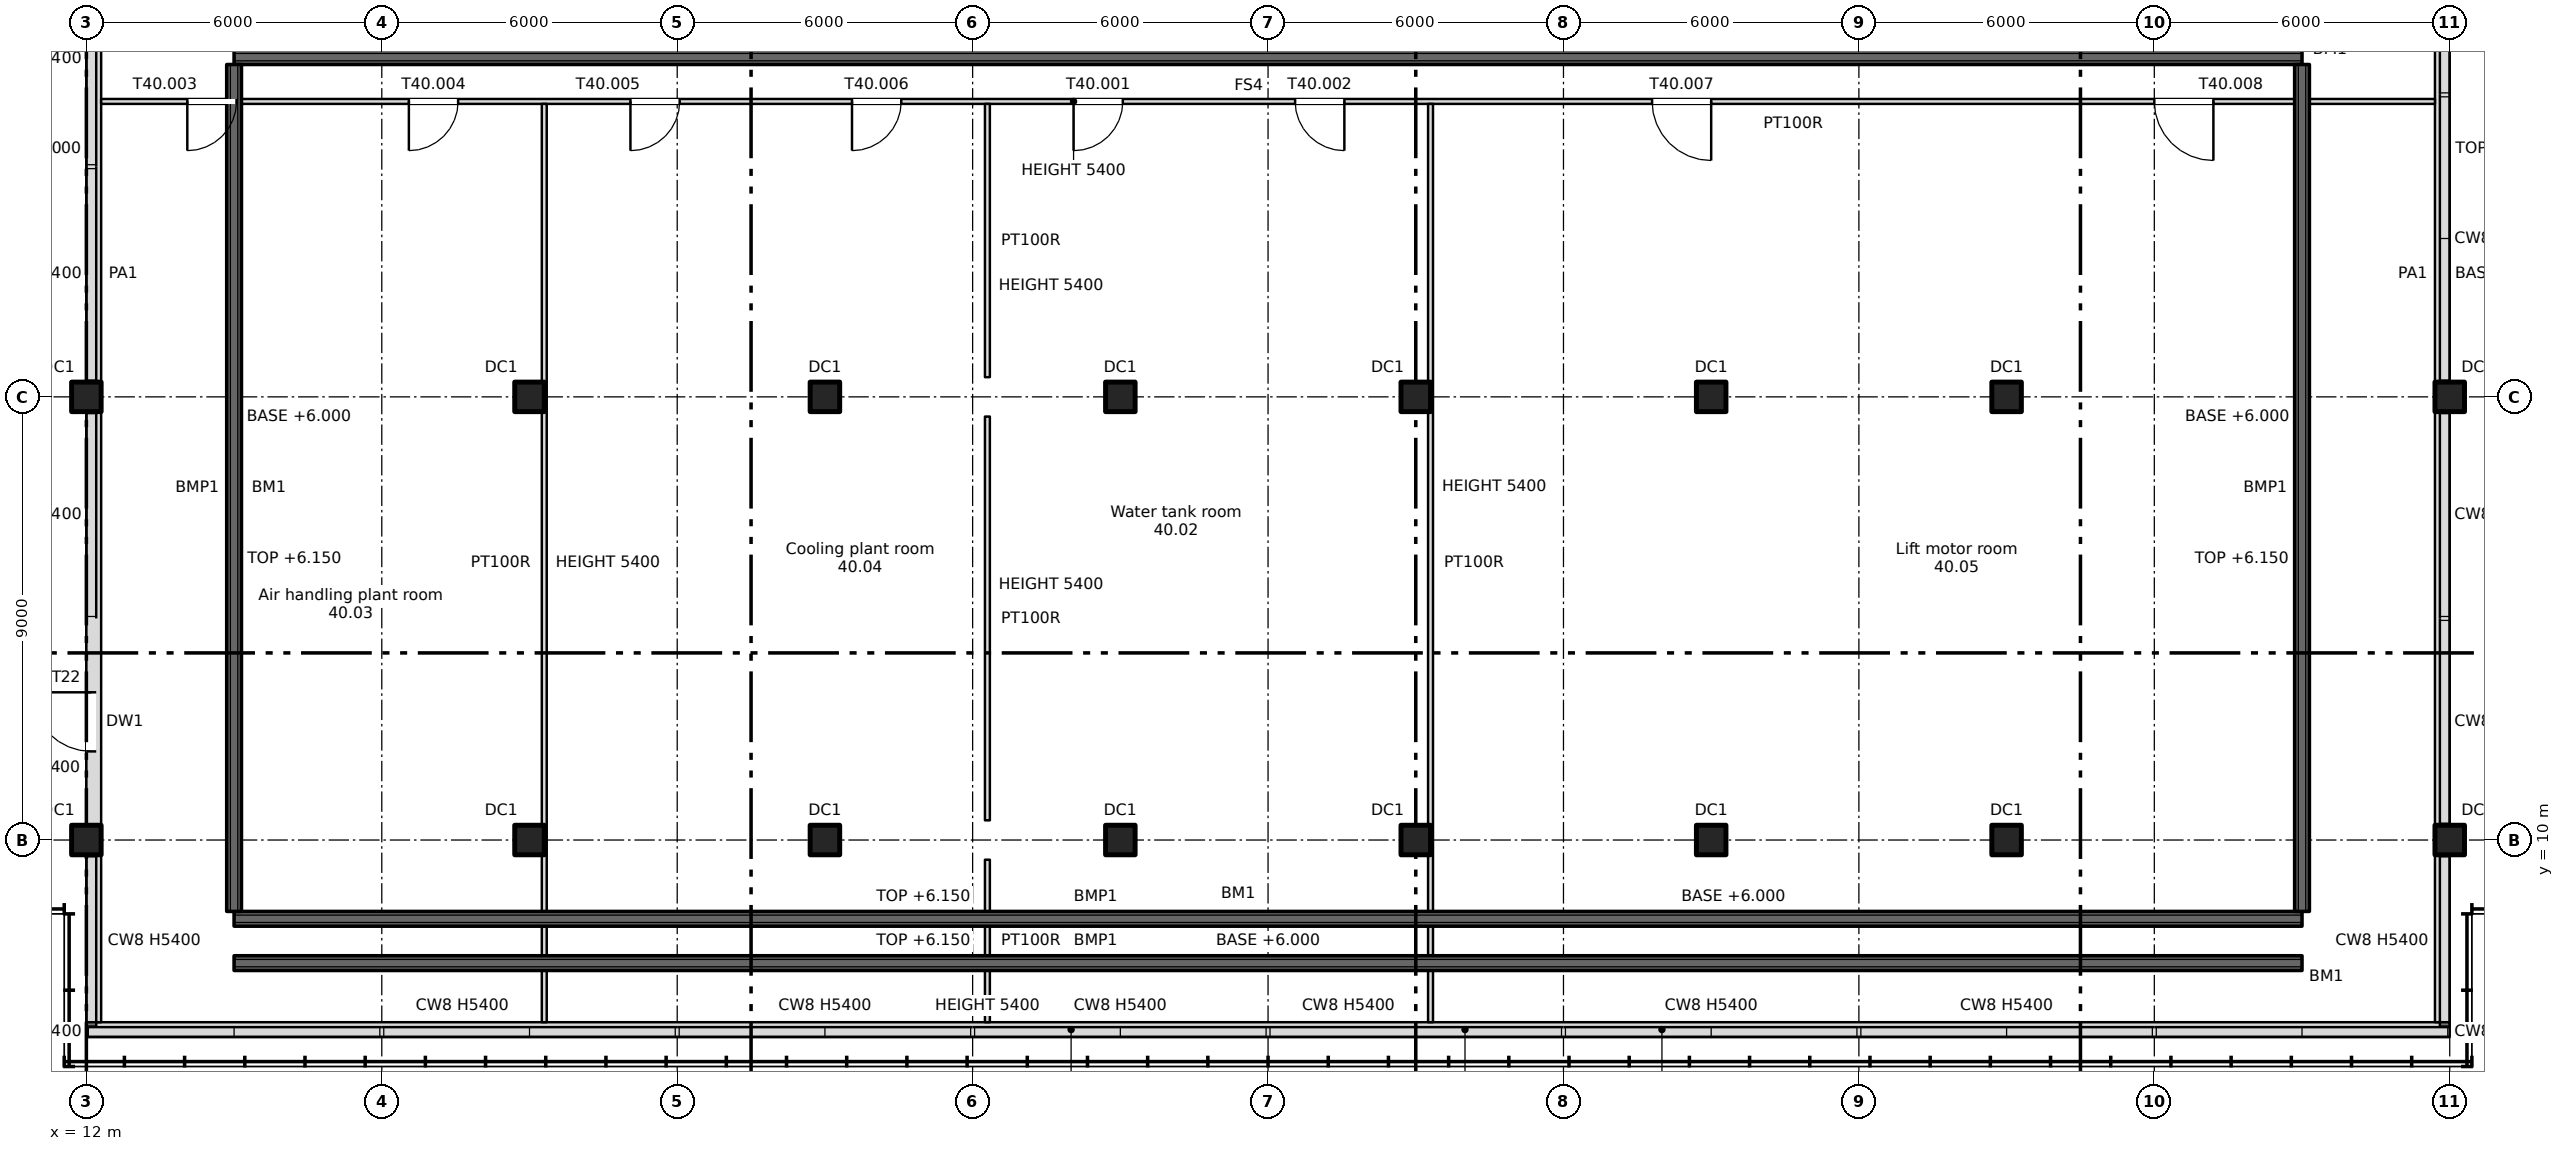
"""IFC4 building model, lengths in metres.
Left out: names, types, materials, properties, quantities, classifications, styles, units other than length and angle.
Written with IfcOpenShell. Run it as: python <this file> out.ifc"""

import sys

from ifc_helpers import new_model, si_unit, direction, frame, frame_2d, origin, origin_2d, place, context, subcontext, project, spatial, rectangle, extrude, element, fill, save


model = new_model("IFC4")
c1 = context("Model", 3, precision=1e-05, world=origin(), true_north=direction((0.0, 1.0)))
c2 = subcontext(c1, "Body", "Model", "MODEL_VIEW")
j1 = project(units=[si_unit("LENGTHUNIT", "METRE"), si_unit("PLANEANGLEUNIT", "RADIAN")], contexts=[c1])
p1 = place(None, origin())
s1 = spatial("IfcSite", under=j1, at=p1, CompositionType="ELEMENT")
p2 = place(p1, origin())
s2 = spatial("IfcBuilding", under=s1, at=p2, CompositionType="ELEMENT")
p3 = place(p2, frame((0.0, 0.0, 271.95)))
s3 = spatial("IfcBuildingStorey", under=s2, at=p3, CompositionType="ELEMENT", Elevation=271.95)
for number, where, z_axis, x_axis in (
    (1, (21.0, 10.0, 0.0), (0.0, 0.0, 1.0), (1.0, 0.0, 0.0)),
    (2, (27.0, 10.0, 0.0), (0.0, 0.0, 1.0), (1.0, 0.0, 0.0)),
    (3, (33.0, 10.0, 0.0), (0.0, 0.0, 1.0), (1.0, 0.0, 0.0)),
    (4, (39.0, 10.0, 0.0), (0.0, 0.0, 1.0), (1.0, 0.0, 0.0)),
    (5, (45.0, 10.0, 0.0), (0.0, 0.0, 1.0), (1.0, 0.0, 0.0)),
    (6, (51.0, 10.0, 0.0), (0.0, 0.0, 1.0), (1.0, 0.0, 0.0)),
    (7, (21.0, 19.0, 0.0), (0.0, 0.0, 1.0), (1.0, 0.0, 0.0)),
    (8, (27.0, 19.0, 0.0), (0.0, 0.0, 1.0), (1.0, 0.0, 0.0)),
    (9, (33.0, 19.0, 0.0), (0.0, 0.0, 1.0), (1.0, 0.0, 0.0)),
    (10, (39.0, 19.0, 0.0), (0.0, 0.0, 1.0), (1.0, 0.0, 0.0)),
    (11, (45.0, 19.0, 0.0), (0.0, 0.0, 1.0), (1.0, 0.0, 0.0)),
    (12, (51.0, 19.0, 0.0), (0.0, 0.0, 1.0), (1.0, 0.0, 0.0)),
    (13, (12.0, 10.0, 0.0), (0.0, 0.0, 1.0), (1.0, 0.0, 0.0)),
    (14, (12.0, 19.0, 0.0), (0.0, 0.0, 1.0), (1.0, 0.0, 0.0)),
    (15, (60.0, 10.0, 0.0), (0.0, 0.0, 1.0), (1.0, 0.0, 0.0)),
    (16, (60.0, 19.0, 0.0), (0.0, 0.0, 1.0), (1.0, 0.0, 0.0)),
):
    element("IfcColumn", number, at=place(p3, frame(where, z_axis=z_axis, x_axis=x_axis)), inside=s3, PredefinedType="COLUMN", context=c2, shape_type="SweptSolid", body=[
        extrude(rectangle(XDim=0.6, YDim=0.6, at=origin_2d()), origin(), (0.0, 0.0, 1.0), 5.5),
    ])
p4 = place(p3, frame((12.1, 10.3, 0.0), z_axis=(0.0, 0.0, 1.0), x_axis=(0.0, 1.0, 0.0)))
e17 = element("IfcWall", 17, at=p4, inside=s3, PredefinedType="SOLIDWALL", context=c2, shape_type="SweptSolid", body=[
    extrude(rectangle(XDim=4.2, YDim=0.2, at=frame_2d((2.1, 0.0))), origin(), (0.0, 0.0, 1.0), 5.4),
])
p5 = place(p4, frame((1.5, 0.0, 0.0)))
e18 = element("IfcOpeningElement", 18, at=p5, cuts=e17, PredefinedType="OPENING", context=c2, shape_type="SweptSolid", body=[
    extrude(rectangle(XDim=1.2, YDim=2.4, at=frame_2d((0.6, 1.2))), frame((0.0, 0.11, 0.0), z_axis=(0.0, -1.0, 0.0), x_axis=(1.0, 0.0, 0.0)), (0.0, 0.0, 1.0), 0.22),
])
p6 = place(p3, frame((12.0, 6.15, 6.0), z_axis=(0.0, 0.0, 1.0), x_axis=(1.0, 0.0, 0.0)))
e19 = element("IfcWall", 19, at=p6, inside=s3, PredefinedType="PARAPET", context=c2, shape_type="SweptSolid", body=[
    extrude(rectangle(XDim=48.0, YDim=0.3, at=frame_2d((24.0, 0.0))), origin(), (0.0, 0.0, 1.0), 1.1),
])
for number, where, z_axis, x_axis in (
    (20, (12.15, 6.3, 6.0), (0.0, 0.0, 1.0), (0.0, 1.0, 0.0)),
    (21, (59.85, 6.3, 6.0), (0.0, 0.0, 1.0), (0.0, 1.0, 0.0)),
):
    element("IfcWall", number, at=place(p3, frame(where, z_axis=z_axis, x_axis=x_axis)), inside=s3, PredefinedType="PARAPET", context=c2, shape_type="SweptSolid", body=[
        extrude(rectangle(XDim=30.4, YDim=0.3, at=frame_2d((15.2, 0.0))), origin(), (0.0, 0.0, 1.0), 1.1),
    ])
for number, where, z_axis, x_axis in (
    (22, (15.0, 7.5, 6.0), (0.0, 0.0, 1.0), (1.0, 0.0, 0.0)),
    (23, (15.0, 8.4, 6.0), (0.0, 0.0, 1.0), (1.0, 0.0, 0.0)),
    (24, (15.0, 25.9, 6.0), (0.0, 0.0, 1.0), (1.0, 0.0, 0.0)),
):
    element("IfcWall", number, at=place(p3, frame(where, z_axis=z_axis, x_axis=x_axis)), inside=s3, PredefinedType="SOLIDWALL", context=c2, shape_type="SweptSolid", body=[
        extrude(rectangle(XDim=42.0, YDim=0.3, at=frame_2d((21.0, 0.0))), origin(), (0.0, 0.0, 1.0), 0.15),
    ])
for number, where, z_axis, x_axis in (
    (25, (15.0, 8.55, 6.0), (0.0, 0.0, 1.0), (0.0, 1.0, 0.0)),
    (26, (57.0, 8.55, 6.0), (0.0, 0.0, 1.0), (0.0, 1.0, 0.0)),
):
    element("IfcWall", number, at=place(p3, frame(where, z_axis=z_axis, x_axis=x_axis)), inside=s3, PredefinedType="SOLIDWALL", context=c2, shape_type="SweptSolid", body=[
        extrude(rectangle(XDim=17.2, YDim=0.3, at=frame_2d((8.6, 0.0))), origin(), (0.0, 0.0, 1.0), 0.15),
    ])
p7 = place(p3, frame((12.3, 25.0, 0.0), z_axis=(0.0, 0.0, 1.0), x_axis=(1.0, 0.0, 0.0)))
e27 = element("IfcWall", 27, at=p7, inside=s3, PredefinedType="PARTITIONING", context=c2, shape_type="SweptSolid", body=[
    extrude(rectangle(XDim=47.4, YDim=0.1, at=frame_2d((23.7, 0.0))), origin(), (0.0, 0.0, 1.0), 5.4),
])
p8 = place(p7, frame((19.75, 0.0, 0.0)))
e28 = element("IfcOpeningElement", 28, at=p8, cuts=e27, PredefinedType="OPENING", context=c2, shape_type="SweptSolid", body=[
    extrude(rectangle(XDim=1.0, YDim=2.1, at=frame_2d((0.5, 1.05))), frame((0.0, 0.06, 0.0), z_axis=(0.0, -1.0, 0.0), x_axis=(1.0, 0.0, 0.0)), (0.0, 0.0, 1.0), 0.12),
])
p9 = place(p7, frame((24.25, 0.0, 0.0)))
e29 = element("IfcOpeningElement", 29, at=p9, cuts=e27, PredefinedType="OPENING", context=c2, shape_type="SweptSolid", body=[
    extrude(rectangle(XDim=1.0, YDim=2.1, at=frame_2d((0.5, 1.05))), frame((0.0, 0.06, 0.0), z_axis=(0.0, -1.0, 0.0), x_axis=(1.0, 0.0, 0.0)), (0.0, 0.0, 1.0), 0.12),
])
p10 = place(p7, frame((1.75, 0.0, 0.0)))
e30 = element("IfcOpeningElement", 30, at=p10, cuts=e27, PredefinedType="OPENING", context=c2, shape_type="SweptSolid", body=[
    extrude(rectangle(XDim=1.0, YDim=2.1, at=frame_2d((0.5, 1.05))), frame((0.0, 0.06, 0.0), z_axis=(0.0, -1.0, 0.0), x_axis=(1.0, 0.0, 0.0)), (0.0, 0.0, 1.0), 0.12),
])
p11 = place(p7, frame((6.25, 0.0, 0.0)))
e31 = element("IfcOpeningElement", 31, at=p11, cuts=e27, PredefinedType="OPENING", context=c2, shape_type="SweptSolid", body=[
    extrude(rectangle(XDim=1.0, YDim=2.1, at=frame_2d((0.5, 1.05))), frame((0.0, 0.06, 0.0), z_axis=(0.0, -1.0, 0.0), x_axis=(1.0, 0.0, 0.0)), (0.0, 0.0, 1.0), 0.12),
])
p12 = place(p7, frame((10.75, 0.0, 0.0)))
e32 = element("IfcOpeningElement", 32, at=p12, cuts=e27, PredefinedType="OPENING", context=c2, shape_type="SweptSolid", body=[
    extrude(rectangle(XDim=1.0, YDim=2.1, at=frame_2d((0.5, 1.05))), frame((0.0, 0.06, 0.0), z_axis=(0.0, -1.0, 0.0), x_axis=(1.0, 0.0, 0.0)), (0.0, 0.0, 1.0), 0.12),
])
p13 = place(p7, frame((15.25, 0.0, 0.0)))
e33 = element("IfcOpeningElement", 33, at=p13, cuts=e27, PredefinedType="OPENING", context=c2, shape_type="SweptSolid", body=[
    extrude(rectangle(XDim=1.0, YDim=2.1, at=frame_2d((0.5, 1.05))), frame((0.0, 0.06, 0.0), z_axis=(0.0, -1.0, 0.0), x_axis=(1.0, 0.0, 0.0)), (0.0, 0.0, 1.0), 0.12),
])
p14 = place(p7, frame((31.5, 0.0, 0.0)))
e34 = element("IfcOpeningElement", 34, at=p14, cuts=e27, PredefinedType="OPENING", context=c2, shape_type="SweptSolid", body=[
    extrude(rectangle(XDim=1.2, YDim=2.1, at=frame_2d((0.6, 1.05))), frame((0.0, 0.06, 0.0), z_axis=(0.0, -1.0, 0.0), x_axis=(1.0, 0.0, 0.0)), (0.0, 0.0, 1.0), 0.12),
])
p15 = place(p7, frame((41.7, 0.0, 0.0)))
e35 = element("IfcOpeningElement", 35, at=p15, cuts=e27, PredefinedType="OPENING", context=c2, shape_type="SweptSolid", body=[
    extrude(rectangle(XDim=1.2, YDim=2.1, at=frame_2d((0.6, 1.05))), frame((0.0, 0.06, 0.0), z_axis=(0.0, -1.0, 0.0), x_axis=(1.0, 0.0, 0.0)), (0.0, 0.0, 1.0), 0.12),
])
p16 = place(p3, frame((21.3, 6.3, 0.0), z_axis=(0.0, 0.0, 1.0), x_axis=(0.0, 1.0, 0.0)))
e36 = element("IfcWall", 36, at=p16, inside=s3, PredefinedType="PARTITIONING", context=c2, shape_type="SweptSolid", body=[
    extrude(rectangle(XDim=18.65, YDim=0.1, at=frame_2d((9.325, 0.0))), origin(), (0.0, 0.0, 1.0), 5.4),
])
p17 = place(p3, frame((30.3, 6.3, 0.0), z_axis=(0.0, 0.0, 1.0), x_axis=(0.0, 1.0, 0.0)))
e37 = element("IfcWall", 37, at=p17, inside=s3, PredefinedType="PARTITIONING", context=c2, shape_type="SweptSolid", body=[
    extrude(rectangle(XDim=3.3, YDim=0.1, at=frame_2d((1.65, 0.0))), origin(), (0.0, 0.0, 1.0), 5.4),
])
p18 = place(p3, frame((30.3, 10.4, 0.0), z_axis=(0.0, 0.0, 1.0), x_axis=(0.0, 1.0, 0.0)))
e38 = element("IfcWall", 38, at=p18, inside=s3, PredefinedType="PARTITIONING", context=c2, shape_type="SweptSolid", body=[
    extrude(rectangle(XDim=8.2, YDim=0.1, at=frame_2d((4.1, 0.0))), origin(), (0.0, 0.0, 1.0), 5.4),
])
p19 = place(p3, frame((30.3, 19.4, 0.0), z_axis=(0.0, 0.0, 1.0), x_axis=(0.0, 1.0, 0.0)))
e39 = element("IfcWall", 39, at=p19, inside=s3, PredefinedType="PARTITIONING", context=c2, shape_type="SweptSolid", body=[
    extrude(rectangle(XDim=5.55, YDim=0.1, at=frame_2d((2.775, 0.0))), origin(), (0.0, 0.0, 1.0), 5.4),
])
p20 = place(p3, frame((39.3, 6.3, 0.0), z_axis=(0.0, 0.0, 1.0), x_axis=(0.0, 1.0, 0.0)))
e40 = element("IfcWall", 40, at=p20, inside=s3, PredefinedType="PARTITIONING", context=c2, shape_type="SweptSolid", body=[
    extrude(rectangle(XDim=18.65, YDim=0.1, at=frame_2d((9.325, 0.0))), origin(), (0.0, 0.0, 1.0), 5.4),
])
p21 = place(p5, origin())
e41 = element("IfcDoor", 41, at=p21, inside=s3, OperationType="SINGLE_SWING_RIGHT", PredefinedType="DOOR", context=c2, shape_type="SweptSolid", body=[
    extrude(rectangle(XDim=1.2, YDim=2.4, at=frame_2d((0.6, 1.2))), frame((0.0, 0.025, 0.0), z_axis=(0.0, -1.0, 0.0), x_axis=(1.0, 0.0, 0.0)), (0.0, 0.0, 1.0), 0.05),
])
fill(e18, e41)
p22 = place(p8, origin())
e42 = element("IfcDoor", 42, at=p22, inside=s3, OperationType="SINGLE_SWING_LEFT", PredefinedType="DOOR", context=c2, shape_type="SweptSolid", body=[
    extrude(rectangle(XDim=1.0, YDim=2.1, at=frame_2d((0.5, 1.05))), frame((0.0, 0.025, 0.0), z_axis=(0.0, -1.0, 0.0), x_axis=(1.0, 0.0, 0.0)), (0.0, 0.0, 1.0), 0.05),
])
fill(e28, e42)
p23 = place(p9, origin())
e43 = element("IfcDoor", 43, at=p23, inside=s3, OperationType="SINGLE_SWING_RIGHT", PredefinedType="DOOR", context=c2, shape_type="SweptSolid", body=[
    extrude(rectangle(XDim=1.0, YDim=2.1, at=frame_2d((0.5, 1.05))), frame((0.0, 0.025, 0.0), z_axis=(0.0, -1.0, 0.0), x_axis=(1.0, 0.0, 0.0)), (0.0, 0.0, 1.0), 0.05),
])
fill(e29, e43)
p24 = place(p10, origin())
e44 = element("IfcDoor", 44, at=p24, inside=s3, OperationType="SINGLE_SWING_LEFT", PredefinedType="DOOR", context=c2, shape_type="SweptSolid", body=[
    extrude(rectangle(XDim=1.0, YDim=2.1, at=frame_2d((0.5, 1.05))), frame((0.0, 0.025, 0.0), z_axis=(0.0, -1.0, 0.0), x_axis=(1.0, 0.0, 0.0)), (0.0, 0.0, 1.0), 0.05),
])
fill(e30, e44)
p25 = place(p11, origin())
e45 = element("IfcDoor", 45, at=p25, inside=s3, OperationType="SINGLE_SWING_LEFT", PredefinedType="DOOR", context=c2, shape_type="SweptSolid", body=[
    extrude(rectangle(XDim=1.0, YDim=2.1, at=frame_2d((0.5, 1.05))), frame((0.0, 0.025, 0.0), z_axis=(0.0, -1.0, 0.0), x_axis=(1.0, 0.0, 0.0)), (0.0, 0.0, 1.0), 0.05),
])
fill(e31, e45)
p26 = place(p12, origin())
e46 = element("IfcDoor", 46, at=p26, inside=s3, OperationType="SINGLE_SWING_LEFT", PredefinedType="DOOR", context=c2, shape_type="SweptSolid", body=[
    extrude(rectangle(XDim=1.0, YDim=2.1, at=frame_2d((0.5, 1.05))), frame((0.0, 0.025, 0.0), z_axis=(0.0, -1.0, 0.0), x_axis=(1.0, 0.0, 0.0)), (0.0, 0.0, 1.0), 0.05),
])
fill(e32, e46)
p27 = place(p13, origin())
e47 = element("IfcDoor", 47, at=p27, inside=s3, OperationType="SINGLE_SWING_LEFT", PredefinedType="DOOR", context=c2, shape_type="SweptSolid", body=[
    extrude(rectangle(XDim=1.0, YDim=2.1, at=frame_2d((0.5, 1.05))), frame((0.0, 0.025, 0.0), z_axis=(0.0, -1.0, 0.0), x_axis=(1.0, 0.0, 0.0)), (0.0, 0.0, 1.0), 0.05),
])
fill(e33, e47)
p28 = place(p14, origin())
e48 = element("IfcDoor", 48, at=p28, inside=s3, OperationType="SINGLE_SWING_RIGHT", PredefinedType="DOOR", context=c2, shape_type="SweptSolid", body=[
    extrude(rectangle(XDim=1.2, YDim=2.1, at=frame_2d((0.6, 1.05))), frame((0.0, 0.025, 0.0), z_axis=(0.0, -1.0, 0.0), x_axis=(1.0, 0.0, 0.0)), (0.0, 0.0, 1.0), 0.05),
])
fill(e34, e48)
p29 = place(p15, origin())
e49 = element("IfcDoor", 49, at=p29, inside=s3, OperationType="SINGLE_SWING_RIGHT", PredefinedType="DOOR", context=c2, shape_type="SweptSolid", body=[
    extrude(rectangle(XDim=1.2, YDim=2.1, at=frame_2d((0.6, 1.05))), frame((0.0, 0.025, 0.0), z_axis=(0.0, -1.0, 0.0), x_axis=(1.0, 0.0, 0.0)), (0.0, 0.0, 1.0), 0.05),
])
fill(e35, e49)
save(model, sys.argv[1])
